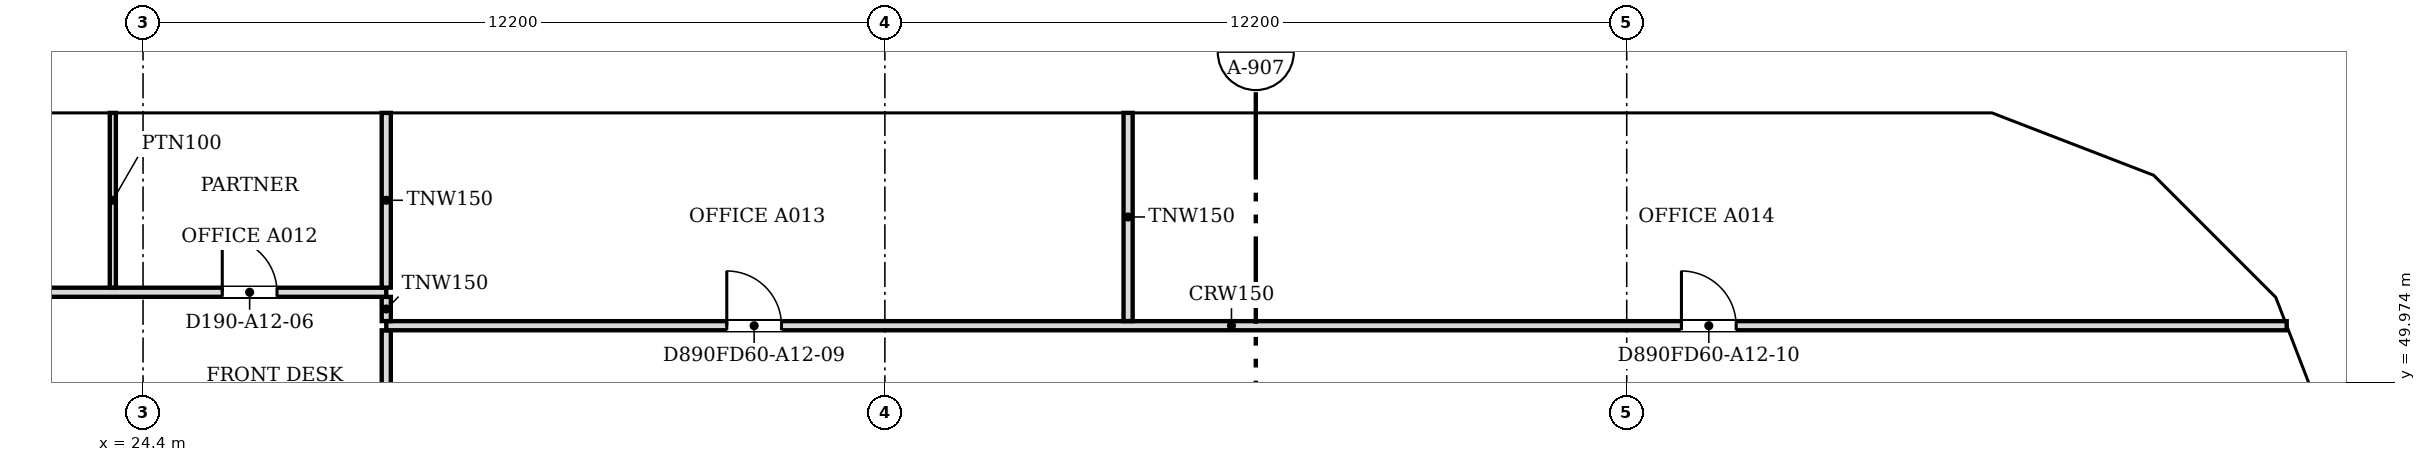
"""IFC4 building model, lengths in metres.
Left out: names, types, materials, properties, quantities, classifications, styles, units other than length and angle.
Written with IfcOpenShell. Run it as: python <this file> out.ifc"""

import sys

from ifc_helpers import new_model, si_unit, direction, frame, frame_2d, origin, place, context, subcontext, project, spatial, polyline, rectangle, outline, extrude, faceted_brep, source, transform, mapped, element, fill, save


model = new_model("IFC4")
c1 = context("Model", 3, precision=1e-05, world=origin(), true_north=direction((0.0, 1.0)))
c2 = subcontext(c1, "Body", "Model", "MODEL_VIEW")
j1 = project(units=[si_unit("LENGTHUNIT", "METRE"), si_unit("PLANEANGLEUNIT", "RADIAN")], contexts=[c1])
p1 = place(None, origin())
s1 = spatial("IfcSite", under=j1, at=p1, CompositionType="ELEMENT")
p2 = place(p1, origin())
s2 = spatial("IfcBuilding", under=s1, at=p2, CompositionType="ELEMENT")
p3 = place(p2, frame((0.0, 0.0, 139.2)))
s3 = spatial("IfcBuildingStorey", under=s2, at=p3, CompositionType="ELEMENT", Elevation=139.2)
m1 = source(origin(), c2, "Body", "Brep", [
    faceted_brep([(0.047, -0.25, 0.0), (2.997, -0.25, 3.8), (0.047, -0.25, 7.6), (0.0, -0.25, 7.541), (0.0, -0.25, 0.059), (0.093, 0.25, 7.54), (2.944, 0.25, 3.868), (2.944, 0.25, 3.732), (0.093, 0.25, 0.06), (2.997, 0.0, 3.8), (0.047, 0.0, 0.0), (0.047, 0.0, 7.6)], [[[0, 1, 2, 3, 4]], [[5, 6, 7, 8]], [[8, 7, 9, 1, 0, 10]], [[6, 5, 11, 2, 1, 9]], [[3, 2, 11]], [[10, 0, 4]], [[8, 10, 4, 3, 11, 5]], [[9, 7, 6]]]),
])
p4 = place(p3, frame((60.767, 48.71, -3.8), z_axis=(0.0, 0.0, 1.0), x_axis=(-0.359901446078, 0.932990326376, 0.0)))
e1 = element("IfcWall", 1, at=p4, inside=s3, PredefinedType="SOLIDWALL", context=c2, shape_type="MappedRepresentation", body=[
    mapped(m1, transform((0.0, 0.0, 0.0), scale=1.0)),
])
m2 = source(origin(), c2, "Body", "SweptSolid", [
    extrude(outline(polyline([(0.247, 0.665), (2.681, 3.8), (0.247, 6.935), (0.247, 0.665)])), frame((0.0, 0.26, 0.0), z_axis=(0.0, -1.0, 0.0), x_axis=(1.0, 0.0, 0.0)), (0.0, 0.0, 1.0), 0.52),
])
p5 = place(p4, origin())
e2 = element("IfcOpeningElement", 2, at=p5, cuts=e1, PredefinedType="OPENING", context=c2, shape_type="MappedRepresentation", body=[
    mapped(m2, transform((0.0, 0.0, 0.0), scale=1.0)),
])
m3 = source(origin(), c2, "Body", "Brep", [
    faceted_brep([(2.944, -0.25, 0.0), (2.997, -0.25, 0.068), (2.997, -0.25, 7.532), (2.944, -0.25, 7.6), (0.0, -0.25, 3.8), (0.053, 0.25, 3.868), (2.891, 0.25, 7.532), (2.891, 0.25, 0.068), (0.053, 0.25, 3.732), (2.944, 0.0, 0.0), (2.944, 0.0, 7.6), (0.0, 0.0, 3.8)], [[[0, 1, 2, 3, 4]], [[5, 6, 7, 8]], [[1, 0, 9]], [[10, 3, 2]], [[6, 5, 11, 4, 3, 10]], [[8, 7, 9, 0, 4, 11]], [[8, 11, 5]], [[1, 9, 7, 6, 10, 2]]]),
])
p6 = place(p3, frame((59.688, 51.506, -3.8), z_axis=(0.0, 0.0, 1.0), x_axis=(-0.707106781187, 0.707106781187, 0.0)))
e3 = element("IfcWall", 3, at=p6, inside=s3, PredefinedType="SOLIDWALL", context=c2, shape_type="MappedRepresentation", body=[
    mapped(m3, transform((0.0, 0.0, 0.0), scale=1.0)),
])
m4 = source(origin(), c2, "Body", "SweptSolid", [
    extrude(outline(polyline([(2.744, 6.934), (0.316, 3.8), (2.744, 0.667), (2.744, 6.934)])), frame((0.0, 0.26, 0.0), z_axis=(0.0, -1.0, 0.0), x_axis=(1.0, 0.0, 0.0)), (0.0, 0.0, 1.0), 0.52),
])
p7 = place(p6, origin())
e4 = element("IfcOpeningElement", 4, at=p7, cuts=e3, PredefinedType="OPENING", context=c2, shape_type="MappedRepresentation", body=[
    mapped(m4, transform((0.0, 0.0, 0.0), scale=1.0)),
])
m5 = source(origin(), c2, "Body", "Brep", [
    faceted_brep([(0.053, -0.25, 0.0), (3.003, -0.25, 3.8), (0.053, -0.25, 7.6), (0.0, -0.25, 7.532), (0.0, -0.25, 0.068), (0.106, 0.25, 7.532), (2.957, 0.25, 3.86), (2.957, 0.25, 3.74), (0.106, 0.25, 0.068), (3.003, 0.0, 3.8), (0.053, 0.0, 0.0), (0.053, 0.0, 7.6)], [[[0, 1, 2, 3, 4]], [[5, 6, 7, 8]], [[8, 7, 9, 1, 0, 10]], [[6, 5, 11, 2, 1, 9]], [[3, 2, 11]], [[10, 0, 4]], [[8, 10, 4, 3, 11, 5]], [[9, 7, 6]]]),
])
p8 = place(p3, frame((57.656, 53.569, -3.8), z_axis=(0.0, 0.0, 1.0), x_axis=(-0.933007896601, 0.359855894603, 0.0)))
e5 = element("IfcWall", 5, at=p8, inside=s3, PredefinedType="SOLIDWALL", context=c2, shape_type="MappedRepresentation", body=[
    mapped(m5, transform((0.0, 0.0, 0.0), scale=1.0)),
])
m6 = source(origin(), c2, "Body", "SweptSolid", [
    extrude(outline(polyline([(0.253, 0.665), (2.687, 3.8), (0.253, 6.935), (0.253, 0.665)])), frame((0.0, 0.26, 0.0), z_axis=(0.0, -1.0, 0.0), x_axis=(1.0, 0.0, 0.0)), (0.0, 0.0, 1.0), 0.52),
])
p9 = place(p8, origin())
e6 = element("IfcOpeningElement", 6, at=p9, cuts=e5, PredefinedType="OPENING", context=c2, shape_type="MappedRepresentation", body=[
    mapped(m6, transform((0.0, 0.0, 0.0), scale=1.0)),
])
m7 = source(origin(), c2, "Body", "Brep", [
    faceted_brep([(3.003, -0.25, 0.0), (6.053, -0.25, 3.8), (3.003, -0.25, 7.6), (0.0, -0.25, 3.8), (0.047, 0.25, 3.859), (3.003, 0.25, 7.6), (6.053, 0.25, 3.8), (3.003, 0.25, 0.0), (0.047, 0.25, 3.741), (0.0, 0.0, 3.8)], [[[0, 1, 2, 3]], [[4, 5, 6, 7, 8]], [[7, 6, 1, 0]], [[6, 5, 2, 1]], [[5, 4, 9, 3, 2]], [[8, 7, 0, 3, 9]], [[8, 9, 4]]]),
])
p10 = place(p3, frame((54.854, 54.65, -3.8), z_axis=(0.0, 0.0, 1.0), x_axis=(-1.0, 0.0, 0.0)))
e7 = element("IfcWall", 7, at=p10, inside=s3, PredefinedType="SOLIDWALL", context=c2, shape_type="MappedRepresentation", body=[
    mapped(m7, transform((0.0, 0.0, 0.0), scale=1.0)),
])
m8 = source(origin(), c2, "Body", "SweptSolid", [
    extrude(outline(polyline([(3.005, 0.401), (5.733, 3.8), (3.005, 7.199), (0.319, 3.8), (3.005, 0.401)])), frame((0.0, 0.26, 0.0), z_axis=(0.0, -1.0, 0.0), x_axis=(1.0, 0.0, 0.0)), (0.0, 0.0, 1.0), 0.52),
])
p11 = place(p10, origin())
e8 = element("IfcOpeningElement", 8, at=p11, cuts=e7, PredefinedType="OPENING", context=c2, shape_type="MappedRepresentation", body=[
    mapped(m8, transform((0.0, 0.0, 0.0), scale=1.0)),
])
m9 = source(origin(), c2, "Body", "SweptSolid", [
    extrude(outline(polyline([(3.05, 0.0), (6.1, 3.8), (3.05, 7.6), (0.0, 3.8), (3.05, 0.0)])), frame((0.0, 0.25, 0.0), z_axis=(0.0, -1.0, 0.0), x_axis=(1.0, 0.0, 0.0)), (0.0, 0.0, 1.0), 0.5),
])
p12 = place(p3, frame((48.8, 54.65, -3.8), z_axis=(0.0, 0.0, 1.0), x_axis=(-1.0, 0.0, 0.0)))
e9 = element("IfcWall", 9, at=p12, inside=s3, PredefinedType="SOLIDWALL", context=c2, shape_type="MappedRepresentation", body=[
    mapped(m9, transform((0.0, 0.0, 0.0), scale=1.0)),
])
m10 = source(origin(), c2, "Body", "SweptSolid", [
    extrude(outline(polyline([(3.05, 0.399), (5.78, 3.8), (3.05, 7.201), (0.321, 3.8), (3.05, 0.399)])), frame((0.0, 0.26, 0.0), z_axis=(0.0, -1.0, 0.0), x_axis=(1.0, 0.0, 0.0)), (0.0, 0.0, 1.0), 0.52),
])
p13 = place(p12, origin())
e10 = element("IfcOpeningElement", 10, at=p13, cuts=e9, PredefinedType="OPENING", context=c2, shape_type="MappedRepresentation", body=[
    mapped(m10, transform((0.0, 0.0, 0.0), scale=1.0)),
])
m11 = source(origin(), c2, "Body", "Brep", [
    faceted_brep([(3.05, -0.25, 0.0), (6.1, -0.25, 3.8), (6.1, -0.25, 3.8), (3.05, -0.25, 7.6), (0.0, -0.25, 3.8), (0.0, 0.25, 3.8), (3.05, 0.25, 7.6), (6.1, 0.25, 3.8), (6.1, 0.25, 3.8), (3.05, 0.25, 0.0)], [[[0, 1, 2, 3, 4]], [[5, 6, 7, 8, 9]], [[9, 8, 1, 0]], [[7, 6, 3, 2]], [[6, 5, 4, 3]], [[5, 9, 0, 4]], [[1, 8, 7, 2]]]),
])
p14 = place(p3, frame((42.7, 54.65, -3.8), z_axis=(0.0, 0.0, 1.0), x_axis=(-1.0, 0.0, 0.0)))
e11 = element("IfcWall", 11, at=p14, inside=s3, PredefinedType="SOLIDWALL", context=c2, shape_type="MappedRepresentation", body=[
    mapped(m11, transform((0.0, 0.0, 0.0), scale=1.0)),
])
p15 = place(p14, origin())
e12 = element("IfcOpeningElement", 12, at=p15, cuts=e11, PredefinedType="OPENING", context=c2, shape_type="MappedRepresentation", body=[
    mapped(m10, transform((0.0, 0.0, 0.0), scale=1.0)),
])
p16 = place(p3, frame((36.6, 54.65, -3.8), z_axis=(0.0, 0.0, 1.0), x_axis=(-1.0, 0.0, 0.0)))
e13 = element("IfcWall", 13, at=p16, inside=s3, PredefinedType="SOLIDWALL", context=c2, shape_type="MappedRepresentation", body=[
    mapped(m9, transform((0.0, 0.0, 0.0), scale=1.0)),
])
p17 = place(p16, origin())
e14 = element("IfcOpeningElement", 14, at=p17, cuts=e13, PredefinedType="OPENING", context=c2, shape_type="MappedRepresentation", body=[
    mapped(m10, transform((0.0, 0.0, 0.0), scale=1.0)),
])
p18 = place(p3, frame((30.5, 54.65, -3.8), z_axis=(0.0, 0.0, 1.0), x_axis=(-1.0, 0.0, 0.0)))
e15 = element("IfcWall", 15, at=p18, inside=s3, PredefinedType="SOLIDWALL", context=c2, shape_type="MappedRepresentation", body=[
    mapped(m9, transform((0.0, 0.0, 0.0), scale=1.0)),
])
p19 = place(p18, origin())
e16 = element("IfcOpeningElement", 16, at=p19, cuts=e15, PredefinedType="OPENING", context=c2, shape_type="MappedRepresentation", body=[
    mapped(m10, transform((0.0, 0.0, 0.0), scale=1.0)),
])
p20 = place(p3, frame((24.4, 54.65, -3.8), z_axis=(0.0, 0.0, 1.0), x_axis=(-1.0, 0.0, 0.0)))
e17 = element("IfcWall", 17, at=p20, inside=s3, PredefinedType="SOLIDWALL", context=c2, shape_type="MappedRepresentation", body=[
    mapped(m11, transform((0.0, 0.0, 0.0), scale=1.0)),
])
p21 = place(p20, origin())
e18 = element("IfcOpeningElement", 18, at=p21, cuts=e17, PredefinedType="OPENING", context=c2, shape_type="MappedRepresentation", body=[
    mapped(m10, transform((0.0, 0.0, 0.0), scale=1.0)),
])
p22 = place(p2, frame((0.0, 0.0, 143.0)))
s4 = spatial("IfcBuildingStorey", under=s2, at=p22, CompositionType="ELEMENT", Elevation=143.0)
m12 = source(origin(), c2, "Body", "Brep", [
    faceted_brep([(2.95, -0.25, 0.0), (3.003, -0.25, 0.068), (3.003, -0.25, 7.532), (2.95, -0.25, 7.6), (0.0, -0.25, 3.8), (0.047, 0.25, 3.86), (2.898, 0.25, 7.532), (2.898, 0.25, 0.068), (0.047, 0.25, 3.74), (2.95, 0.0, 0.0), (2.95, 0.0, 7.6), (0.0, 0.0, 3.8)], [[[0, 1, 2, 3, 4]], [[5, 6, 7, 8]], [[1, 0, 9]], [[10, 3, 2]], [[6, 5, 11, 4, 3, 10]], [[8, 7, 9, 0, 4, 11]], [[8, 11, 5]], [[1, 9, 7, 6, 10, 2]]]),
])
p23 = place(p22, frame((60.75, 48.753, -3.8), z_axis=(0.0, 0.0, 1.0), x_axis=(-0.35992665181, 0.932980602862, 0.0)))
e19 = element("IfcWall", 19, at=p23, inside=s4, PredefinedType="SOLIDWALL", context=c2, shape_type="MappedRepresentation", body=[
    mapped(m12, transform((0.0, 0.0, 0.0), scale=1.0)),
])
m13 = source(origin(), c2, "Body", "SweptSolid", [
    extrude(outline(polyline([(2.75, 6.935), (0.316, 3.8), (2.75, 0.665), (2.75, 6.935)])), frame((0.0, 0.26, 0.0), z_axis=(0.0, -1.0, 0.0), x_axis=(1.0, 0.0, 0.0)), (0.0, 0.0, 1.0), 0.52),
])
p24 = place(p23, origin())
e20 = element("IfcOpeningElement", 20, at=p24, cuts=e19, PredefinedType="OPENING", context=c2, shape_type="MappedRepresentation", body=[
    mapped(m13, transform((0.0, 0.0, 0.0), scale=1.0)),
])
m14 = source(origin(), c2, "Body", "Brep", [
    faceted_brep([(0.053, -0.25, 0.0), (2.997, -0.25, 3.8), (0.053, -0.25, 7.6), (0.0, -0.25, 7.532), (0.0, -0.25, 0.068), (0.106, 0.25, 7.532), (2.944, 0.25, 3.868), (2.944, 0.25, 3.732), (0.106, 0.25, 0.068), (2.997, 0.0, 3.8), (0.053, 0.0, 0.0), (0.053, 0.0, 7.6)], [[[0, 1, 2, 3, 4]], [[5, 6, 7, 8]], [[8, 7, 9, 1, 0, 10]], [[6, 5, 11, 2, 1, 9]], [[3, 2, 11]], [[10, 0, 4]], [[8, 10, 4, 3, 11, 5]], [[9, 7, 6]]]),
])
p25 = place(p22, frame((59.726, 51.469, -3.8), z_axis=(0.0, 0.0, 1.0), x_axis=(-0.707106781187, 0.707106781187, 0.0)))
e21 = element("IfcWall", 21, at=p25, inside=s4, PredefinedType="SOLIDWALL", context=c2, shape_type="MappedRepresentation", body=[
    mapped(m14, transform((0.0, 0.0, 0.0), scale=1.0)),
])
m15 = source(origin(), c2, "Body", "SweptSolid", [
    extrude(outline(polyline([(0.253, 0.666), (2.681, 3.8), (0.253, 6.934), (0.253, 0.666)])), frame((0.0, 0.26, 0.0), z_axis=(0.0, -1.0, 0.0), x_axis=(1.0, 0.0, 0.0)), (0.0, 0.0, 1.0), 0.52),
])
p26 = place(p25, origin())
e22 = element("IfcOpeningElement", 22, at=p26, cuts=e21, PredefinedType="OPENING", context=c2, shape_type="MappedRepresentation", body=[
    mapped(m15, transform((0.0, 0.0, 0.0), scale=1.0)),
])
m16 = source(origin(), c2, "Body", "Brep", [
    faceted_brep([(2.95, -0.25, 0.0), (2.997, -0.25, 0.059), (2.997, -0.25, 7.541), (2.95, -0.25, 7.6), (0.0, -0.25, 3.8), (0.053, 0.25, 3.868), (2.904, 0.25, 7.54), (2.904, 0.25, 0.06), (0.053, 0.25, 3.732), (2.95, 0.0, 0.0), (2.95, 0.0, 7.6), (0.0, 0.0, 3.8)], [[[0, 1, 2, 3, 4]], [[5, 6, 7, 8]], [[1, 0, 9]], [[10, 3, 2]], [[6, 5, 11, 4, 3, 10]], [[8, 7, 9, 0, 4, 11]], [[8, 11, 5]], [[1, 9, 7, 6, 10, 2]]]),
])
p27 = place(p22, frame((57.606, 53.588, -3.8), z_axis=(0.0, 0.0, 1.0), x_axis=(-0.932990326376, 0.359901446078, 0.0)))
e23 = element("IfcWall", 23, at=p27, inside=s4, PredefinedType="SOLIDWALL", context=c2, shape_type="MappedRepresentation", body=[
    mapped(m16, transform((0.0, 0.0, 0.0), scale=1.0)),
])
p28 = place(p27, origin())
e24 = element("IfcOpeningElement", 24, at=p28, cuts=e23, PredefinedType="OPENING", context=c2, shape_type="MappedRepresentation", body=[
    mapped(m13, transform((0.0, 0.0, 0.0), scale=1.0)),
])
m17 = source(origin(), c2, "Body", "Brep", [
    faceted_brep([(0.047, -0.25, 0.0), (3.05, -0.25, 3.8), (0.047, -0.25, 7.6), (0.0, -0.25, 7.54), (0.0, -0.25, 0.06), (0.093, 0.25, 7.541), (3.05, 0.25, 3.8), (0.093, 0.25, 0.059), (0.047, 0.0, 0.0), (0.047, 0.0, 7.6)], [[[0, 1, 2, 3, 4]], [[5, 6, 7]], [[7, 6, 1, 0, 8]], [[6, 5, 9, 2, 1]], [[3, 2, 9]], [[8, 0, 4]], [[7, 8, 4, 3, 9, 5]]]),
])
p29 = place(p22, frame((54.9, 54.65, -3.8), z_axis=(0.0, 0.0, 1.0), x_axis=(-1.0, 0.0, 0.0)))
e25 = element("IfcWall", 25, at=p29, inside=s4, PredefinedType="SOLIDWALL", context=c2, shape_type="MappedRepresentation", body=[
    mapped(m17, transform((0.0, 0.0, 0.0), scale=1.0)),
])
m18 = source(origin(), c2, "Body", "SweptSolid", [
    extrude(outline(polyline([(0.247, 0.656), (2.731, 3.8), (0.247, 6.944), (0.247, 0.656)])), frame((0.0, 0.26, 0.0), z_axis=(0.0, -1.0, 0.0), x_axis=(1.0, 0.0, 0.0)), (0.0, 0.0, 1.0), 0.52),
])
p30 = place(p29, origin())
e26 = element("IfcOpeningElement", 26, at=p30, cuts=e25, PredefinedType="OPENING", context=c2, shape_type="MappedRepresentation", body=[
    mapped(m18, transform((0.0, 0.0, 0.0), scale=1.0)),
])
p31 = place(p22, frame((51.85, 54.65, -3.8), z_axis=(0.0, 0.0, 1.0), x_axis=(-1.0, 0.0, 0.0)))
e27 = element("IfcWall", 27, at=p31, inside=s4, PredefinedType="SOLIDWALL", context=c2, shape_type="MappedRepresentation", body=[
    mapped(m9, transform((0.0, 0.0, 0.0), scale=1.0)),
])
p32 = place(p31, origin())
e28 = element("IfcOpeningElement", 28, at=p32, cuts=e27, PredefinedType="OPENING", context=c2, shape_type="MappedRepresentation", body=[
    mapped(m10, transform((0.0, 0.0, 0.0), scale=1.0)),
])
p33 = place(p22, frame((45.75, 54.65, -3.8), z_axis=(0.0, 0.0, 1.0), x_axis=(-1.0, 0.0, 0.0)))
e29 = element("IfcWall", 29, at=p33, inside=s4, PredefinedType="SOLIDWALL", context=c2, shape_type="MappedRepresentation", body=[
    mapped(m9, transform((0.0, 0.0, 0.0), scale=1.0)),
])
p34 = place(p33, origin())
e30 = element("IfcOpeningElement", 30, at=p34, cuts=e29, PredefinedType="OPENING", context=c2, shape_type="MappedRepresentation", body=[
    mapped(m10, transform((0.0, 0.0, 0.0), scale=1.0)),
])
p35 = place(p22, frame((39.65, 54.65, -3.8), z_axis=(0.0, 0.0, 1.0), x_axis=(-1.0, 0.0, 0.0)))
e31 = element("IfcWall", 31, at=p35, inside=s4, PredefinedType="SOLIDWALL", context=c2, shape_type="MappedRepresentation", body=[
    mapped(m11, transform((0.0, 0.0, 0.0), scale=1.0)),
])
p36 = place(p35, origin())
e32 = element("IfcOpeningElement", 32, at=p36, cuts=e31, PredefinedType="OPENING", context=c2, shape_type="MappedRepresentation", body=[
    mapped(m10, transform((0.0, 0.0, 0.0), scale=1.0)),
])
p37 = place(p22, frame((33.55, 54.65, -3.8), z_axis=(0.0, 0.0, 1.0), x_axis=(-1.0, 0.0, 0.0)))
e33 = element("IfcWall", 33, at=p37, inside=s4, PredefinedType="SOLIDWALL", context=c2, shape_type="MappedRepresentation", body=[
    mapped(m9, transform((0.0, 0.0, 0.0), scale=1.0)),
])
p38 = place(p37, origin())
e34 = element("IfcOpeningElement", 34, at=p38, cuts=e33, PredefinedType="OPENING", context=c2, shape_type="MappedRepresentation", body=[
    mapped(m10, transform((0.0, 0.0, 0.0), scale=1.0)),
])
p39 = place(p22, frame((27.45, 54.65, -3.8), z_axis=(0.0, 0.0, 1.0), x_axis=(-1.0, 0.0, 0.0)))
e35 = element("IfcWall", 35, at=p39, inside=s4, PredefinedType="SOLIDWALL", context=c2, shape_type="MappedRepresentation", body=[
    mapped(m11, transform((0.0, 0.0, 0.0), scale=1.0)),
])
p40 = place(p39, origin())
e36 = element("IfcOpeningElement", 36, at=p40, cuts=e35, PredefinedType="OPENING", context=c2, shape_type="MappedRepresentation", body=[
    mapped(m10, transform((0.0, 0.0, 0.0), scale=1.0)),
])
p41 = place(p3, frame((28.4, 48.176, 0.0), z_axis=(0.0, 0.0, 1.0), x_axis=(0.0, 1.0, 0.0)))
e37 = element("IfcWall", 37, at=p41, inside=s3, PredefinedType="PARTITIONING", context=c2, shape_type="SweptSolid", body=[
    extrude(rectangle(XDim=2.648, YDim=0.15, at=frame_2d((1.324, 0.0))), origin(), (0.0, 0.0, 1.0), 3.067),
])
p42 = place(p3, frame((28.4, 50.9, 0.0), z_axis=(0.0, 0.0, 1.0), x_axis=(1.0, 0.0, 0.0)))
e38 = element("IfcWall", 38, at=p42, inside=s3, PredefinedType="PARTITIONING", context=c2, shape_type="SweptSolid", body=[
    extrude(rectangle(XDim=31.254, YDim=0.15, at=frame_2d((15.627, 0.0))), origin(), (0.0, 0.0, 1.0), 3.067),
])
m19 = source(origin(), c2, "Body", "SweptSolid", [
    extrude(rectangle(XDim=0.9, YDim=2.1, at=frame_2d((0.45, 1.05))), frame((0.0, 0.085, 0.0), z_axis=(0.0, -1.0, 0.0), x_axis=(1.0, 0.0, 0.0)), (0.0, 0.0, 1.0), 0.17),
])
p43 = place(p42, frame((5.6, 0.0, 0.0)))
e39 = element("IfcOpeningElement", 39, at=p43, cuts=e38, PredefinedType="OPENING", context=c2, shape_type="MappedRepresentation", body=[
    mapped(m19, transform((0.0, 0.0, 0.0), scale=1.0)),
])
p44 = place(p42, frame((21.3, 0.0, 0.0)))
e40 = element("IfcOpeningElement", 40, at=p44, cuts=e38, PredefinedType="OPENING", context=c2, shape_type="MappedRepresentation", body=[
    mapped(m19, transform((0.0, 0.0, 0.0), scale=1.0)),
])
p45 = place(p3, frame((28.4, 50.976, 0.0), z_axis=(0.0, 0.0, 1.0), x_axis=(0.0, 1.0, 0.0)))
e41 = element("IfcWall", 41, at=p45, inside=s3, PredefinedType="PARTITIONING", context=c2, shape_type="SweptSolid", body=[
    extrude(rectangle(XDim=0.398, YDim=0.15, at=frame_2d((0.199, 0.0))), origin(), (0.0, 0.0, 1.0), 3.067),
])
p46 = place(p3, frame((40.6, 50.976, 0.0), z_axis=(0.0, 0.0, 1.0), x_axis=(0.0, 1.0, 0.0)))
e42 = element("IfcWall", 42, at=p46, inside=s3, PredefinedType="PARTITIONING", context=c2, shape_type="SweptSolid", body=[
    extrude(rectangle(XDim=3.424, YDim=0.15, at=frame_2d((1.712, 0.0))), origin(), (0.0, 0.0, 1.0), 3.067),
])
p47 = place(p3, frame((7.5, 51.45, 0.0), z_axis=(0.0, 0.0, 1.0), x_axis=(1.0, 0.0, 0.0)))
e43 = element("IfcWall", 43, at=p47, inside=s3, PredefinedType="PARTITIONING", context=c2, shape_type="SweptSolid", body=[
    extrude(rectangle(XDim=20.9, YDim=0.15, at=frame_2d((10.45, 0.0))), origin(), (0.0, 0.0, 1.0), 3.067),
])
p48 = place(p47, frame((13.901, 0.0, 0.0)))
e44 = element("IfcOpeningElement", 44, at=p48, cuts=e43, PredefinedType="OPENING", context=c2, shape_type="MappedRepresentation", body=[
    mapped(m19, transform((0.0, 0.0, 0.0), scale=1.0)),
])
p49 = place(p47, frame((18.203, 0.0, 0.0)))
e45 = element("IfcOpeningElement", 45, at=p49, cuts=e43, PredefinedType="OPENING", context=c2, shape_type="MappedRepresentation", body=[
    mapped(m19, transform((0.0, 0.0, 0.0), scale=1.0)),
])
p50 = place(p47, frame((2.5, 0.0, 0.0)))
e46 = element("IfcOpeningElement", 46, at=p50, cuts=e43, PredefinedType="OPENING", context=c2, shape_type="MappedRepresentation", body=[
    mapped(m19, transform((0.0, 0.0, 0.0), scale=1.0)),
])
p51 = place(p47, frame((8.594, 0.0, 0.0)))
e47 = element("IfcOpeningElement", 47, at=p51, cuts=e43, PredefinedType="OPENING", context=c2, shape_type="MappedRepresentation", body=[
    mapped(m19, transform((0.0, 0.0, 0.0), scale=1.0)),
])
p52 = place(p3, frame((23.903, 51.526, 0.0), z_axis=(0.0, 0.0, 1.0), x_axis=(0.0, 1.0, 0.0)))
e48 = element("IfcWall", 48, at=p52, inside=s3, PredefinedType="PARTITIONING", context=c2, shape_type="SweptSolid", body=[
    extrude(rectangle(XDim=2.874, YDim=0.1, at=frame_2d((1.437, 0.0))), origin(), (0.0, 0.0, 1.0), 3.067),
])
p53 = place(p3, frame((28.4, 51.526, 0.0), z_axis=(0.0, 0.0, 1.0), x_axis=(0.0, 1.0, 0.0)))
e49 = element("IfcWall", 49, at=p53, inside=s3, PredefinedType="PARTITIONING", context=c2, shape_type="SweptSolid", body=[
    extrude(rectangle(XDim=2.874, YDim=0.15, at=frame_2d((1.437, 0.0))), origin(), (0.0, 0.0, 1.0), 3.067),
])
m20 = source(origin(), c2, "Body", "SweptSolid", [
    extrude(rectangle(XDim=0.9, YDim=2.1, at=frame_2d((0.45, 1.05))), frame((0.0, 0.025, 0.0), z_axis=(0.0, -1.0, 0.0), x_axis=(1.0, 0.0, 0.0)), (0.0, 0.0, 1.0), 0.05),
])
p54 = place(p49, origin())
e50 = element("IfcDoor", 50, at=p54, inside=s3, OperationType="SINGLE_SWING_LEFT", PredefinedType="DOOR", context=c2, shape_type="MappedRepresentation", body=[
    mapped(m20, transform((0.0, 0.0, 0.0), scale=1.0)),
])
fill(e45, e50)
p55 = place(p43, origin())
e51 = element("IfcDoor", 51, at=p55, inside=s3, OperationType="SINGLE_SWING_LEFT", PredefinedType="DOOR", context=c2, shape_type="MappedRepresentation", body=[
    mapped(m20, transform((0.0, 0.0, 0.0), scale=1.0)),
])
fill(e39, e51)
p56 = place(p44, origin())
e52 = element("IfcDoor", 52, at=p56, inside=s3, OperationType="SINGLE_SWING_LEFT", PredefinedType="DOOR", context=c2, shape_type="MappedRepresentation", body=[
    mapped(m20, transform((0.0, 0.0, 0.0), scale=1.0)),
])
fill(e40, e52)
save(model, sys.argv[1])
